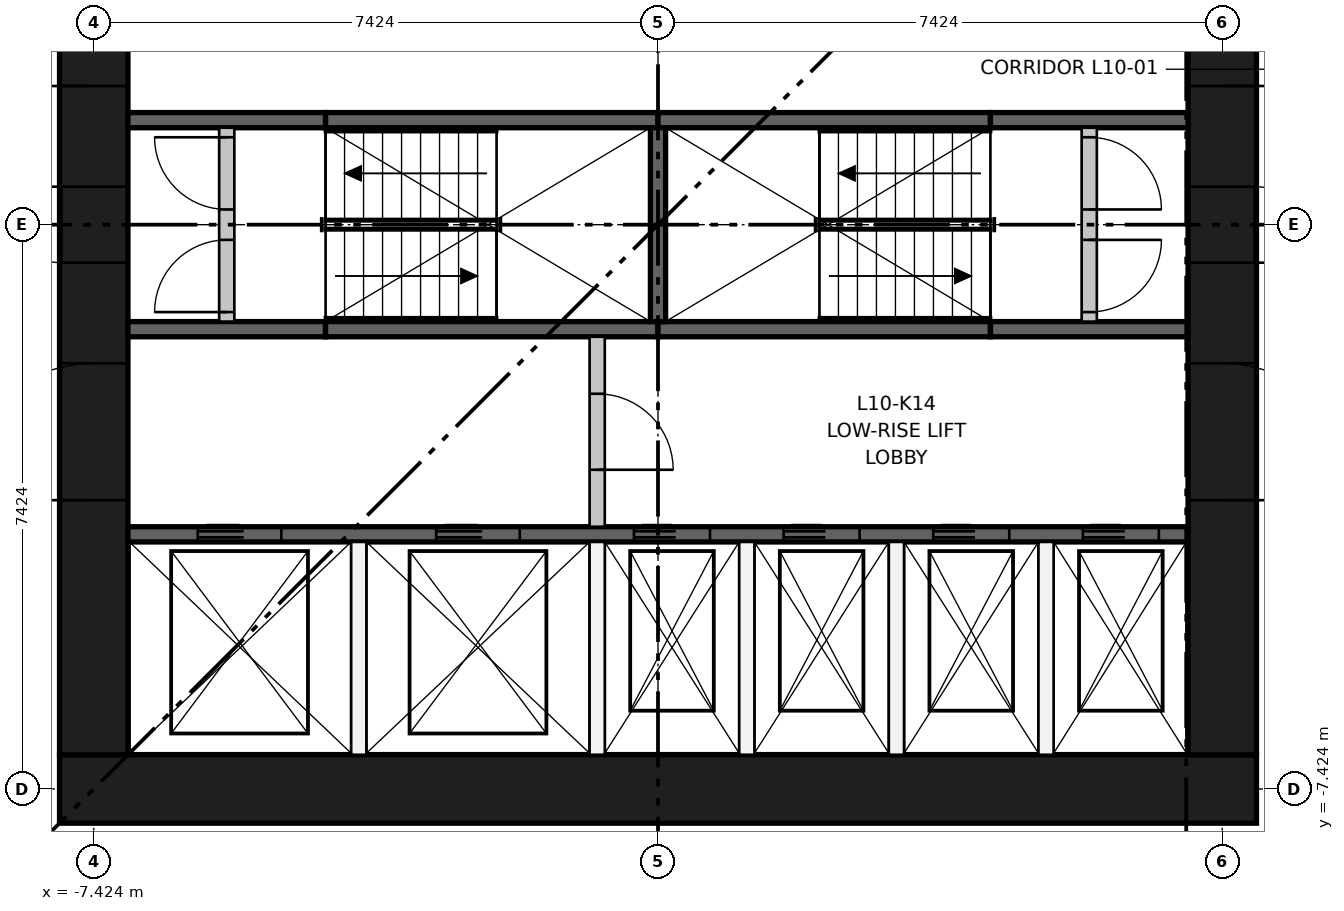
"""IFC4 building model, lengths in metres.
Left out: names, types, materials, properties, quantities, classifications, styles, units other than length and angle.
Written with IfcOpenShell. Run it as: python <this file> out.ifc"""

import sys

from ifc_helpers import new_model, si_unit, direction, frame, frame_2d, origin, place, context, subcontext, project, spatial, rectangle, extrude, element, fill, save


model = new_model("IFC4")
c1 = context("Model", 3, precision=1e-05, world=origin(), true_north=direction((0.0, 1.0)))
c2 = subcontext(c1, "Body", "Model", "MODEL_VIEW")
j1 = project(units=[si_unit("LENGTHUNIT", "METRE"), si_unit("PLANEANGLEUNIT", "RADIAN")], contexts=[c1])
p1 = place(None, origin())
s1 = spatial("IfcSite", under=j1, at=p1, CompositionType="ELEMENT")
p2 = place(p1, origin())
s2 = spatial("IfcBuilding", under=s1, at=p2, CompositionType="ELEMENT")
p3 = place(p2, frame((0.0, 0.0, 40.8)))
s3 = spatial("IfcBuildingStorey", under=s2, at=p3, CompositionType="ELEMENT", Elevation=40.8)
p4 = place(p3, frame((-7.874, -7.424, 0.0), z_axis=(0.0, 0.0, 1.0), x_axis=(1.0, 0.0, 0.0)))
e1 = element("IfcWall", 1, at=p4, inside=s3, PredefinedType="SHEAR", context=c2, shape_type="SweptSolid", body=[
    extrude(rectangle(XDim=15.748, YDim=0.9, at=frame_2d((7.874, 0.0))), origin(), (0.0, 0.0, 1.0), 3.65),
])
p5 = place(p3, frame((-7.424, -6.974, 0.0), z_axis=(0.0, 0.0, 1.0), x_axis=(0.0, 1.0, 0.0)))
e2 = element("IfcWall", 2, at=p5, inside=s3, PredefinedType="SHEAR", context=c2, shape_type="SweptSolid", body=[
    extrude(rectangle(XDim=13.948, YDim=0.9, at=frame_2d((6.974, 0.0))), origin(), (0.0, 0.0, 1.0), 3.65),
])
p6 = place(p5, frame((6.474, 0.0, 0.0)))
e3 = element("IfcOpeningElement", 3, at=p6, cuts=e2, PredefinedType="OPENING", context=c2, shape_type="SweptSolid", body=[
    extrude(rectangle(XDim=1.0, YDim=2.1, at=frame_2d((0.5, 1.05))), frame((0.0, 0.46, 0.0), z_axis=(0.0, -1.0, 0.0), x_axis=(1.0, 0.0, 0.0)), (0.0, 0.0, 1.0), 0.92),
])
p7 = place(p5, frame((3.35, 0.0, 0.0)))
e4 = element("IfcOpeningElement", 4, at=p7, cuts=e2, PredefinedType="OPENING", context=c2, shape_type="SweptSolid", body=[
    extrude(rectangle(XDim=1.8, YDim=2.1, at=frame_2d((0.9, 1.05))), frame((0.0, 0.46, 0.0), z_axis=(0.0, -1.0, 0.0), x_axis=(1.0, 0.0, 0.0)), (0.0, 0.0, 1.0), 0.92),
])
p8 = place(p5, frame((8.799, 0.0, 0.0)))
e5 = element("IfcOpeningElement", 5, at=p8, cuts=e2, PredefinedType="OPENING", context=c2, shape_type="SweptSolid", body=[
    extrude(rectangle(XDim=1.8, YDim=2.1, at=frame_2d((0.9, 1.05))), frame((0.0, 0.46, 0.0), z_axis=(0.0, -1.0, 0.0), x_axis=(1.0, 0.0, 0.0)), (0.0, 0.0, 1.0), 0.92),
])
p9 = place(p5, frame((11.974, 0.0, 0.0)))
e6 = element("IfcOpeningElement", 6, at=p9, cuts=e2, PredefinedType="OPENING", context=c2, shape_type="SweptSolid", body=[
    extrude(rectangle(XDim=1.0, YDim=2.1, at=frame_2d((0.5, 1.05))), frame((0.0, 0.46, 0.0), z_axis=(0.0, -1.0, 0.0), x_axis=(1.0, 0.0, 0.0)), (0.0, 0.0, 1.0), 0.92),
])
p10 = place(p3, frame((7.424, -6.974, 0.0), z_axis=(0.0, 0.0, 1.0), x_axis=(0.0, 1.0, 0.0)))
e7 = element("IfcWall", 7, at=p10, inside=s3, PredefinedType="SHEAR", context=c2, shape_type="SweptSolid", body=[
    extrude(rectangle(XDim=13.948, YDim=0.9, at=frame_2d((6.974, 0.0))), origin(), (0.0, 0.0, 1.0), 3.65),
])
p11 = place(p10, frame((6.474, 0.0, 0.0)))
e8 = element("IfcOpeningElement", 8, at=p11, cuts=e7, PredefinedType="OPENING", context=c2, shape_type="SweptSolid", body=[
    extrude(rectangle(XDim=1.0, YDim=2.1, at=frame_2d((0.5, 1.05))), frame((0.0, 0.46, 0.0), z_axis=(0.0, -1.0, 0.0), x_axis=(1.0, 0.0, 0.0)), (0.0, 0.0, 1.0), 0.92),
])
p12 = place(p10, frame((3.35, 0.0, 0.0)))
e9 = element("IfcOpeningElement", 9, at=p12, cuts=e7, PredefinedType="OPENING", context=c2, shape_type="SweptSolid", body=[
    extrude(rectangle(XDim=1.8, YDim=2.1, at=frame_2d((0.9, 1.05))), frame((0.0, 0.46, 0.0), z_axis=(0.0, -1.0, 0.0), x_axis=(1.0, 0.0, 0.0)), (0.0, 0.0, 1.0), 0.92),
])
p13 = place(p10, frame((8.799, 0.0, 0.0)))
e10 = element("IfcOpeningElement", 10, at=p13, cuts=e7, PredefinedType="OPENING", context=c2, shape_type="SweptSolid", body=[
    extrude(rectangle(XDim=1.8, YDim=2.1, at=frame_2d((0.9, 1.05))), frame((0.0, 0.46, 0.0), z_axis=(0.0, -1.0, 0.0), x_axis=(1.0, 0.0, 0.0)), (0.0, 0.0, 1.0), 0.92),
])
p14 = place(p3, frame((-6.974, -4.074, 0.0), z_axis=(0.0, 0.0, 1.0), x_axis=(1.0, 0.0, 0.0)))
e11 = element("IfcWall", 11, at=p14, inside=s3, PredefinedType="SHEAR", context=c2, shape_type="SweptSolid", body=[
    extrude(rectangle(XDim=13.948, YDim=0.2, at=frame_2d((6.974, 0.0))), origin(), (0.0, 0.0, 1.0), 3.3),
])
p15 = place(p14, frame((0.918, 0.0, 0.0)))
e12 = element("IfcOpeningElement", 12, at=p15, cuts=e11, PredefinedType="OPENING", context=c2, shape_type="SweptSolid", body=[
    extrude(rectangle(XDim=1.1, YDim=2.1, at=frame_2d((0.55, 1.05))), frame((0.0, 0.11, 0.0), z_axis=(0.0, -1.0, 0.0), x_axis=(1.0, 0.0, 0.0)), (0.0, 0.0, 1.0), 0.22),
])
p16 = place(p14, frame((4.055, 0.0, 0.0)))
e13 = element("IfcOpeningElement", 13, at=p16, cuts=e11, PredefinedType="OPENING", context=c2, shape_type="SweptSolid", body=[
    extrude(rectangle(XDim=1.1, YDim=2.1, at=frame_2d((0.55, 1.05))), frame((0.0, 0.11, 0.0), z_axis=(0.0, -1.0, 0.0), x_axis=(1.0, 0.0, 0.0)), (0.0, 0.0, 1.0), 0.22),
])
p17 = place(p14, frame((6.658, 0.0, 0.0)))
e14 = element("IfcOpeningElement", 14, at=p17, cuts=e11, PredefinedType="OPENING", context=c2, shape_type="SweptSolid", body=[
    extrude(rectangle(XDim=1.0, YDim=2.1, at=frame_2d((0.5, 1.05))), frame((0.0, 0.11, 0.0), z_axis=(0.0, -1.0, 0.0), x_axis=(1.0, 0.0, 0.0)), (0.0, 0.0, 1.0), 0.22),
])
p18 = place(p14, frame((8.627, 0.0, 0.0)))
e15 = element("IfcOpeningElement", 15, at=p18, cuts=e11, PredefinedType="OPENING", context=c2, shape_type="SweptSolid", body=[
    extrude(rectangle(XDim=1.0, YDim=2.1, at=frame_2d((0.5, 1.05))), frame((0.0, 0.11, 0.0), z_axis=(0.0, -1.0, 0.0), x_axis=(1.0, 0.0, 0.0)), (0.0, 0.0, 1.0), 0.22),
])
p19 = place(p14, frame((10.595, 0.0, 0.0)))
e16 = element("IfcOpeningElement", 16, at=p19, cuts=e11, PredefinedType="OPENING", context=c2, shape_type="SweptSolid", body=[
    extrude(rectangle(XDim=1.0, YDim=2.1, at=frame_2d((0.5, 1.05))), frame((0.0, 0.11, 0.0), z_axis=(0.0, -1.0, 0.0), x_axis=(1.0, 0.0, 0.0)), (0.0, 0.0, 1.0), 0.22),
])
p20 = place(p14, frame((12.564, 0.0, 0.0)))
e17 = element("IfcOpeningElement", 17, at=p20, cuts=e11, PredefinedType="OPENING", context=c2, shape_type="SweptSolid", body=[
    extrude(rectangle(XDim=1.0, YDim=2.1, at=frame_2d((0.5, 1.05))), frame((0.0, 0.11, 0.0), z_axis=(0.0, -1.0, 0.0), x_axis=(1.0, 0.0, 0.0)), (0.0, 0.0, 1.0), 0.22),
])
p21 = place(p3, frame((-6.974, -1.375, 0.0), z_axis=(0.0, 0.0, 1.0), x_axis=(1.0, 0.0, 0.0)))
e18 = element("IfcWall", 18, at=p21, inside=s3, PredefinedType="SHEAR", context=c2, shape_type="SweptSolid", body=[
    extrude(rectangle(XDim=2.6, YDim=0.2, at=frame_2d((1.3, 0.0))), origin(), (0.0, 0.0, 1.0), 3.3),
])
for number, where, z_axis, x_axis in (
    (19, (-4.374, -1.375, 0.0), (0.0, 0.0, 1.0), (1.0, 0.0, 0.0)),
    (20, (0.0, -1.375, 0.0), (0.0, 0.0, 1.0), (1.0, 0.0, 0.0)),
):
    element("IfcWall", number, at=place(p3, frame(where, z_axis=z_axis, x_axis=x_axis)), inside=s3, PredefinedType="SHEAR", context=c2, shape_type="SweptSolid", body=[
        extrude(rectangle(XDim=4.374, YDim=0.2, at=frame_2d((2.187, 0.0))), origin(), (0.0, 0.0, 1.0), 3.3),
    ])
for number, where, z_axis, x_axis in (
    (21, (4.374, -1.375, 0.0), (0.0, 0.0, 1.0), (1.0, 0.0, 0.0)),
    (22, (-6.974, 1.375, 0.0), (0.0, 0.0, 1.0), (1.0, 0.0, 0.0)),
):
    element("IfcWall", number, at=place(p3, frame(where, z_axis=z_axis, x_axis=x_axis)), inside=s3, PredefinedType="SHEAR", context=c2, shape_type="SweptSolid", body=[
        extrude(rectangle(XDim=2.6, YDim=0.2, at=frame_2d((1.3, 0.0))), origin(), (0.0, 0.0, 1.0), 3.3),
    ])
for number, where, z_axis, x_axis in (
    (23, (-4.374, 1.375, 0.0), (0.0, 0.0, 1.0), (1.0, 0.0, 0.0)),
    (24, (0.0, 1.375, 0.0), (0.0, 0.0, 1.0), (1.0, 0.0, 0.0)),
):
    element("IfcWall", number, at=place(p3, frame(where, z_axis=z_axis, x_axis=x_axis)), inside=s3, PredefinedType="SHEAR", context=c2, shape_type="SweptSolid", body=[
        extrude(rectangle(XDim=4.374, YDim=0.2, at=frame_2d((2.187, 0.0))), origin(), (0.0, 0.0, 1.0), 3.3),
    ])
p22 = place(p3, frame((4.374, 1.375, 0.0), z_axis=(0.0, 0.0, 1.0), x_axis=(1.0, 0.0, 0.0)))
e25 = element("IfcWall", 25, at=p22, inside=s3, PredefinedType="SHEAR", context=c2, shape_type="SweptSolid", body=[
    extrude(rectangle(XDim=2.6, YDim=0.2, at=frame_2d((1.3, 0.0))), origin(), (0.0, 0.0, 1.0), 3.3),
])
p23 = place(p3, frame((0.0, -1.275, 0.0), z_axis=(0.0, 0.0, 1.0), x_axis=(0.0, 1.0, 0.0)))
e26 = element("IfcWall", 26, at=p23, inside=s3, PredefinedType="SHEAR", context=c2, shape_type="SweptSolid", body=[
    extrude(rectangle(XDim=2.55, YDim=0.2, at=frame_2d((1.275, 0.0))), origin(), (0.0, 0.0, 1.0), 3.3),
])
for number, where, z_axis, x_axis in (
    (27, (-3.937, -6.974, 0.0), (0.0, 0.0, 1.0), (0.0, 1.0, 0.0)),
    (28, (-0.8, -6.974, 0.0), (0.0, 0.0, 1.0), (0.0, 1.0, 0.0)),
):
    element("IfcWall", number, at=place(p3, frame(where, z_axis=z_axis, x_axis=x_axis)), inside=s3, PredefinedType="PARTITIONING", context=c2, shape_type="SweptSolid", body=[
        extrude(rectangle(XDim=2.8, YDim=0.2, at=frame_2d((1.4, 0.0))), origin(), (0.0, 0.0, 1.0), 3.3),
    ])
p24 = place(p3, frame((-0.8, -3.974, 0.0), z_axis=(0.0, 0.0, 1.0), x_axis=(0.0, 1.0, 0.0)))
e29 = element("IfcWall", 29, at=p24, inside=s3, PredefinedType="PARTITIONING", context=c2, shape_type="SweptSolid", body=[
    extrude(rectangle(XDim=2.499, YDim=0.2, at=frame_2d((1.25, 0.0))), origin(), (0.0, 0.0, 1.0), 3.3),
])
p25 = place(p24, frame((0.75, 0.0, 0.0)))
e30 = element("IfcOpeningElement", 30, at=p25, cuts=e29, PredefinedType="OPENING", context=c2, shape_type="SweptSolid", body=[
    extrude(rectangle(XDim=1.0, YDim=2.1, at=frame_2d((0.5, 1.05))), frame((0.0, 0.11, 0.0), z_axis=(0.0, -1.0, 0.0), x_axis=(1.0, 0.0, 0.0)), (0.0, 0.0, 1.0), 0.22),
])
for number, where, z_axis, x_axis in (
    (31, (1.168, -6.974, 0.0), (0.0, 0.0, 1.0), (0.0, 1.0, 0.0)),
    (32, (3.137, -6.974, 0.0), (0.0, 0.0, 1.0), (0.0, 1.0, 0.0)),
    (33, (5.105, -6.974, 0.0), (0.0, 0.0, 1.0), (0.0, 1.0, 0.0)),
):
    element("IfcWall", number, at=place(p3, frame(where, z_axis=z_axis, x_axis=x_axis)), inside=s3, PredefinedType="PARTITIONING", context=c2, shape_type="SweptSolid", body=[
        extrude(rectangle(XDim=2.8, YDim=0.2, at=frame_2d((1.4, 0.0))), origin(), (0.0, 0.0, 1.0), 3.3),
    ])
p26 = place(p3, frame((-5.674, -1.275, 0.0), z_axis=(0.0, 0.0, 1.0), x_axis=(0.0, 1.0, 0.0)))
e34 = element("IfcWall", 34, at=p26, inside=s3, PredefinedType="PARTITIONING", context=c2, shape_type="SweptSolid", body=[
    extrude(rectangle(XDim=2.55, YDim=0.2, at=frame_2d((1.275, 0.0))), origin(), (0.0, 0.0, 1.0), 3.3),
])
p27 = place(p26, frame((0.125, 0.0, 0.0)))
e35 = element("IfcOpeningElement", 35, at=p27, cuts=e34, PredefinedType="OPENING", context=c2, shape_type="SweptSolid", body=[
    extrude(rectangle(XDim=0.95, YDim=2.1, at=frame_2d((0.475, 1.05))), frame((0.0, 0.11, 0.0), z_axis=(0.0, -1.0, 0.0), x_axis=(1.0, 0.0, 0.0)), (0.0, 0.0, 1.0), 0.22),
])
p28 = place(p26, frame((1.475, 0.0, 0.0)))
e36 = element("IfcOpeningElement", 36, at=p28, cuts=e34, PredefinedType="OPENING", context=c2, shape_type="SweptSolid", body=[
    extrude(rectangle(XDim=0.95, YDim=2.1, at=frame_2d((0.475, 1.05))), frame((0.0, 0.11, 0.0), z_axis=(0.0, -1.0, 0.0), x_axis=(1.0, 0.0, 0.0)), (0.0, 0.0, 1.0), 0.22),
])
p29 = place(p3, frame((5.674, -1.275, 0.0), z_axis=(0.0, 0.0, 1.0), x_axis=(0.0, 1.0, 0.0)))
e37 = element("IfcWall", 37, at=p29, inside=s3, PredefinedType="PARTITIONING", context=c2, shape_type="SweptSolid", body=[
    extrude(rectangle(XDim=2.55, YDim=0.2, at=frame_2d((1.275, 0.0))), origin(), (0.0, 0.0, 1.0), 3.3),
])
p30 = place(p29, frame((0.125, 0.0, 0.0)))
e38 = element("IfcOpeningElement", 38, at=p30, cuts=e37, PredefinedType="OPENING", context=c2, shape_type="SweptSolid", body=[
    extrude(rectangle(XDim=0.95, YDim=2.1, at=frame_2d((0.475, 1.05))), frame((0.0, 0.11, 0.0), z_axis=(0.0, -1.0, 0.0), x_axis=(1.0, 0.0, 0.0)), (0.0, 0.0, 1.0), 0.22),
])
p31 = place(p29, frame((1.475, 0.0, 0.0)))
e39 = element("IfcOpeningElement", 39, at=p31, cuts=e37, PredefinedType="OPENING", context=c2, shape_type="SweptSolid", body=[
    extrude(rectangle(XDim=0.95, YDim=2.1, at=frame_2d((0.475, 1.05))), frame((0.0, 0.11, 0.0), z_axis=(0.0, -1.0, 0.0), x_axis=(1.0, 0.0, 0.0)), (0.0, 0.0, 1.0), 0.22),
])
p32 = place(p15, origin())
e40 = element("IfcDoor", 40, at=p32, inside=s3, OperationType="DOUBLE_DOOR_SLIDING", PredefinedType="DOOR", context=c2, shape_type="SweptSolid", body=[
    extrude(rectangle(XDim=1.1, YDim=2.1, at=frame_2d((0.55, 1.05))), frame((0.0, 0.025, 0.0), z_axis=(0.0, -1.0, 0.0), x_axis=(1.0, 0.0, 0.0)), (0.0, 0.0, 1.0), 0.05),
])
fill(e12, e40)
p33 = place(p16, origin())
e41 = element("IfcDoor", 41, at=p33, inside=s3, OperationType="DOUBLE_DOOR_SLIDING", PredefinedType="DOOR", context=c2, shape_type="SweptSolid", body=[
    extrude(rectangle(XDim=1.1, YDim=2.1, at=frame_2d((0.55, 1.05))), frame((0.0, 0.025, 0.0), z_axis=(0.0, -1.0, 0.0), x_axis=(1.0, 0.0, 0.0)), (0.0, 0.0, 1.0), 0.05),
])
fill(e13, e41)
p34 = place(p17, origin())
e42 = element("IfcDoor", 42, at=p34, inside=s3, OperationType="DOUBLE_DOOR_SLIDING", PredefinedType="DOOR", context=c2, shape_type="SweptSolid", body=[
    extrude(rectangle(XDim=1.0, YDim=2.1, at=frame_2d((0.5, 1.05))), frame((0.0, 0.025, 0.0), z_axis=(0.0, -1.0, 0.0), x_axis=(1.0, 0.0, 0.0)), (0.0, 0.0, 1.0), 0.05),
])
fill(e14, e42)
p35 = place(p18, origin())
e43 = element("IfcDoor", 43, at=p35, inside=s3, OperationType="DOUBLE_DOOR_SLIDING", PredefinedType="DOOR", context=c2, shape_type="SweptSolid", body=[
    extrude(rectangle(XDim=1.0, YDim=2.1, at=frame_2d((0.5, 1.05))), frame((0.0, 0.025, 0.0), z_axis=(0.0, -1.0, 0.0), x_axis=(1.0, 0.0, 0.0)), (0.0, 0.0, 1.0), 0.05),
])
fill(e15, e43)
p36 = place(p19, origin())
e44 = element("IfcDoor", 44, at=p36, inside=s3, OperationType="DOUBLE_DOOR_SLIDING", PredefinedType="DOOR", context=c2, shape_type="SweptSolid", body=[
    extrude(rectangle(XDim=1.0, YDim=2.1, at=frame_2d((0.5, 1.05))), frame((0.0, 0.025, 0.0), z_axis=(0.0, -1.0, 0.0), x_axis=(1.0, 0.0, 0.0)), (0.0, 0.0, 1.0), 0.05),
])
fill(e16, e44)
p37 = place(p20, origin())
e45 = element("IfcDoor", 45, at=p37, inside=s3, OperationType="DOUBLE_DOOR_SLIDING", PredefinedType="DOOR", context=c2, shape_type="SweptSolid", body=[
    extrude(rectangle(XDim=1.0, YDim=2.1, at=frame_2d((0.5, 1.05))), frame((0.0, 0.025, 0.0), z_axis=(0.0, -1.0, 0.0), x_axis=(1.0, 0.0, 0.0)), (0.0, 0.0, 1.0), 0.05),
])
fill(e17, e45)
p38 = place(p27, origin())
e46 = element("IfcDoor", 46, at=p38, inside=s3, OperationType="SINGLE_SWING_LEFT", PredefinedType="DOOR", context=c2, shape_type="SweptSolid", body=[
    extrude(rectangle(XDim=0.95, YDim=2.1, at=frame_2d((0.475, 1.05))), frame((0.0, 0.025, 0.0), z_axis=(0.0, -1.0, 0.0), x_axis=(1.0, 0.0, 0.0)), (0.0, 0.0, 1.0), 0.05),
])
fill(e35, e46)
p39 = place(p28, origin())
e47 = element("IfcDoor", 47, at=p39, inside=s3, OperationType="SINGLE_SWING_RIGHT", PredefinedType="DOOR", context=c2, shape_type="SweptSolid", body=[
    extrude(rectangle(XDim=0.95, YDim=2.1, at=frame_2d((0.475, 1.05))), frame((0.0, 0.025, 0.0), z_axis=(0.0, -1.0, 0.0), x_axis=(1.0, 0.0, 0.0)), (0.0, 0.0, 1.0), 0.05),
])
fill(e36, e47)
p40 = place(p30, frame((0.95, 0.0, 0.0), z_axis=(0.0, 0.0, 1.0), x_axis=(-1.0, 0.0, 0.0)))
e48 = element("IfcDoor", 48, at=p40, inside=s3, OperationType="SINGLE_SWING_RIGHT", PredefinedType="DOOR", context=c2, shape_type="SweptSolid", body=[
    extrude(rectangle(XDim=0.95, YDim=2.1, at=frame_2d((0.475, 1.05))), frame((0.0, 0.025, 0.0), z_axis=(0.0, -1.0, 0.0), x_axis=(1.0, 0.0, 0.0)), (0.0, 0.0, 1.0), 0.05),
])
fill(e38, e48)
p41 = place(p31, frame((0.95, 0.0, 0.0), z_axis=(0.0, 0.0, 1.0), x_axis=(-1.0, 0.0, 0.0)))
e49 = element("IfcDoor", 49, at=p41, inside=s3, OperationType="SINGLE_SWING_LEFT", PredefinedType="DOOR", context=c2, shape_type="SweptSolid", body=[
    extrude(rectangle(XDim=0.95, YDim=2.1, at=frame_2d((0.475, 1.05))), frame((0.0, 0.025, 0.0), z_axis=(0.0, -1.0, 0.0), x_axis=(1.0, 0.0, 0.0)), (0.0, 0.0, 1.0), 0.05),
])
fill(e39, e49)
p42 = place(p25, frame((1.0, 0.0, 0.0), z_axis=(0.0, 0.0, 1.0), x_axis=(-1.0, 0.0, 0.0)))
e50 = element("IfcDoor", 50, at=p42, inside=s3, OperationType="SINGLE_SWING_LEFT", PredefinedType="DOOR", context=c2, shape_type="SweptSolid", body=[
    extrude(rectangle(XDim=1.0, YDim=2.1, at=frame_2d((0.5, 1.05))), frame((0.0, 0.025, 0.0), z_axis=(0.0, -1.0, 0.0), x_axis=(1.0, 0.0, 0.0)), (0.0, 0.0, 1.0), 0.05),
])
fill(e30, e50)
p43 = place(p6, origin())
e51 = element("IfcDoor", 51, at=p43, inside=s3, OperationType="SINGLE_SWING_RIGHT", PredefinedType="DOOR", context=c2, shape_type="SweptSolid", body=[
    extrude(rectangle(XDim=1.0, YDim=2.1, at=frame_2d((0.5, 1.05))), frame((0.0, 0.45, 0.0), z_axis=(0.0, -1.0, 0.0), x_axis=(1.0, 0.0, 0.0)), (0.0, 0.0, 1.0), 0.05),
])
fill(e3, e51)
p44 = place(p7, origin())
e52 = element("IfcDoor", 52, at=p44, inside=s3, OperationType="DOUBLE_DOOR_SINGLE_SWING", PredefinedType="DOOR", context=c2, shape_type="SweptSolid", body=[
    extrude(rectangle(XDim=1.8, YDim=2.1, at=frame_2d((0.9, 1.05))), frame((0.0, 0.025, 0.0), z_axis=(0.0, -1.0, 0.0), x_axis=(1.0, 0.0, 0.0)), (0.0, 0.0, 1.0), 0.05),
])
fill(e4, e52)
p45 = place(p8, origin())
e53 = element("IfcDoor", 53, at=p45, inside=s3, OperationType="DOUBLE_DOOR_SINGLE_SWING", PredefinedType="DOOR", context=c2, shape_type="SweptSolid", body=[
    extrude(rectangle(XDim=1.8, YDim=2.1, at=frame_2d((0.9, 1.05))), frame((0.0, 0.025, 0.0), z_axis=(0.0, -1.0, 0.0), x_axis=(1.0, 0.0, 0.0)), (0.0, 0.0, 1.0), 0.05),
])
fill(e5, e53)
p46 = place(p11, frame((1.0, 0.0, 0.0), z_axis=(0.0, 0.0, 1.0), x_axis=(-1.0, 0.0, 0.0)))
e54 = element("IfcDoor", 54, at=p46, inside=s3, OperationType="SINGLE_SWING_LEFT", PredefinedType="DOOR", context=c2, shape_type="SweptSolid", body=[
    extrude(rectangle(XDim=1.0, YDim=2.1, at=frame_2d((0.5, 1.05))), frame((0.0, 0.45, 0.0), z_axis=(0.0, -1.0, 0.0), x_axis=(1.0, 0.0, 0.0)), (0.0, 0.0, 1.0), 0.05),
])
fill(e8, e54)
p47 = place(p12, frame((1.8, 0.0, 0.0), z_axis=(0.0, 0.0, 1.0), x_axis=(-1.0, 0.0, 0.0)))
e55 = element("IfcDoor", 55, at=p47, inside=s3, OperationType="DOUBLE_DOOR_SINGLE_SWING", PredefinedType="DOOR", context=c2, shape_type="SweptSolid", body=[
    extrude(rectangle(XDim=1.8, YDim=2.1, at=frame_2d((0.9, 1.05))), frame((0.0, 0.025, 0.0), z_axis=(0.0, -1.0, 0.0), x_axis=(1.0, 0.0, 0.0)), (0.0, 0.0, 1.0), 0.05),
])
fill(e9, e55)
p48 = place(p13, frame((1.8, 0.0, 0.0), z_axis=(0.0, 0.0, 1.0), x_axis=(-1.0, 0.0, 0.0)))
e56 = element("IfcDoor", 56, at=p48, inside=s3, OperationType="DOUBLE_DOOR_SINGLE_SWING", PredefinedType="DOOR", context=c2, shape_type="SweptSolid", body=[
    extrude(rectangle(XDim=1.8, YDim=2.1, at=frame_2d((0.9, 1.05))), frame((0.0, 0.025, 0.0), z_axis=(0.0, -1.0, 0.0), x_axis=(1.0, 0.0, 0.0)), (0.0, 0.0, 1.0), 0.05),
])
fill(e10, e56)
save(model, sys.argv[1])
